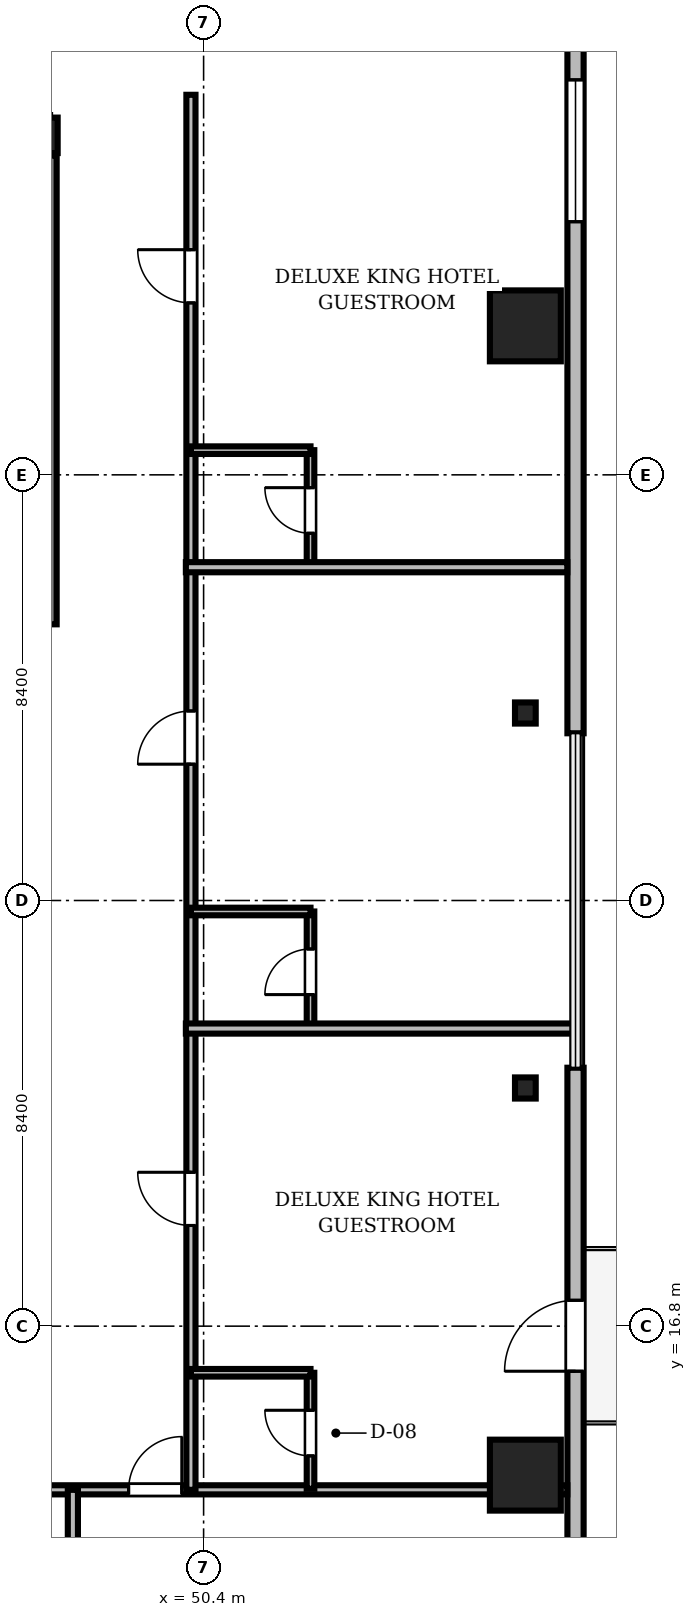
"""IFC4 building model, lengths in metres.
Left out: names, types, materials, properties, quantities, classifications, styles, units other than length and angle.
Written with IfcOpenShell. Run it as: python <this file> out.ifc"""

import sys

from ifc_helpers import new_model, si_unit, direction, frame, frame_2d, origin, origin_2d, place, context, subcontext, project, spatial, rectangle, i_section, extrude, source, transform, mapped, element, fill, save


model = new_model("IFC4")
c1 = context("Model", 3, precision=1e-05, world=origin(), true_north=direction((0.0, 1.0)))
c2 = subcontext(c1, "Body", "Model", "MODEL_VIEW")
j1 = project(units=[si_unit("LENGTHUNIT", "METRE"), si_unit("PLANEANGLEUNIT", "RADIAN")], contexts=[c1])
p1 = place(None, origin())
s1 = spatial("IfcSite", under=j1, at=p1, CompositionType="ELEMENT")
p2 = place(p1, origin())
s2 = spatial("IfcBuilding", under=s1, at=p2, CompositionType="ELEMENT")
p3 = place(p2, frame((0.0, 0.0, 188.55)))
s3 = spatial("IfcBuildingStorey", under=s2, at=p3, CompositionType="ELEMENT", Elevation=188.55)
m1 = source(origin(), c2, "Body", "SweptSolid", [
    extrude(i_section(OverallWidth=0.3, OverallDepth=0.7, WebThickness=0.017, FlangeThickness=0.032, FilletRadius=0.027, at=origin_2d()), origin(), (0.0, 0.0, 1.0), 3.53),
])
p4 = place(p3, frame((47.37, 40.3, 0.0), z_axis=(0.0, 0.0, 1.0), x_axis=(1.0, 0.0, 0.0)))
e1 = element("IfcColumn", 1, at=p4, inside=s3, PredefinedType="COLUMN", context=c2, shape_type="MappedRepresentation", body=[
    mapped(m1, transform((0.0, 0.0, 0.0), scale=1.0)),
])
m2 = source(origin(), c2, "Body", "SweptSolid", [
    extrude(rectangle(XDim=1.4, YDim=1.4, at=origin_2d()), origin(), (0.0, 0.0, 1.0), 3.53),
])
for number, where, z_axis, x_axis in (
    (2, (56.75, 13.86, 0.0), (0.0, 0.0, 1.0), (1.0, 0.0, 0.0)),
    (3, (56.75, 36.54, 0.0), (0.0, 0.0, 1.0), (1.0, 0.0, 0.0)),
):
    element("IfcColumn", number, at=place(p3, frame(where, z_axis=z_axis, x_axis=x_axis)), inside=s3, PredefinedType="COLUMN", context=c2, shape_type="MappedRepresentation", body=[
        mapped(m2, transform((0.0, 0.0, 0.0), scale=1.0)),
    ])
m3 = source(origin(), c2, "Body", "SweptSolid", [
    extrude(i_section(OverallWidth=0.409, OverallDepth=0.417, WebThickness=0.021, FlangeThickness=0.033, FilletRadius=0.015, at=origin_2d()), origin(), (0.0, 0.0, 1.0), 3.53),
])
for number, where, z_axis, x_axis in (
    (4, (56.75, 21.5, 0.0), (0.0, 0.0, 1.0), (1.0, 0.0, 0.0)),
    (5, (56.75, 28.9, 0.0), (0.0, 0.0, 1.0), (1.0, 0.0, 0.0)),
):
    element("IfcColumn", number, at=place(p3, frame(where, z_axis=z_axis, x_axis=x_axis)), inside=s3, PredefinedType="COLUMN", context=c2, shape_type="MappedRepresentation", body=[
        mapped(m3, transform((0.0, 0.0, 0.0), scale=1.0)),
    ])
m4 = source(origin(), c2, "Body", "SweptSolid", [
    extrude(rectangle(XDim=15.6, YDim=0.32, at=frame_2d((7.8, 0.0))), origin(), (0.0, 0.0, 1.0), 3.53),
])
p5 = place(p3, frame((57.74, 6.3, 0.0), z_axis=(0.0, 0.0, 1.0), x_axis=(0.0, 1.0, 0.0)))
e6 = element("IfcWall", 6, at=p5, inside=s3, PredefinedType="SOLIDWALL", context=c2, shape_type="MappedRepresentation", body=[
    mapped(m4, transform((0.0, 0.0, 0.0), scale=1.0)),
])
m5 = source(origin(), c2, "Body", "SweptSolid", [
    extrude(rectangle(XDim=1.4, YDim=2.3, at=frame_2d((0.7, 1.15))), frame((0.0, 0.17, 0.0), z_axis=(0.0, -1.0, 0.0), x_axis=(1.0, 0.0, 0.0)), (0.0, 0.0, 1.0), 0.34),
])
p6 = place(p5, frame((9.61, 0.0, 0.0)))
e7 = element("IfcOpeningElement", 7, at=p6, cuts=e6, PredefinedType="OPENING", context=c2, shape_type="MappedRepresentation", body=[
    mapped(m5, transform((0.0, 0.0, 0.0), scale=1.0)),
])
m6 = source(origin(), c2, "Body", "SweptSolid", [
    extrude(rectangle(XDim=2.8, YDim=2.4, at=frame_2d((1.4, 1.2))), frame((0.0, 0.17, 0.0), z_axis=(0.0, -1.0, 0.0), x_axis=(1.0, 0.0, 0.0)), (0.0, 0.0, 1.0), 0.34),
])
p7 = place(p5, frame((2.705, 0.0, 0.72)))
e8 = element("IfcOpeningElement", 8, at=p7, cuts=e6, PredefinedType="OPENING", context=c2, shape_type="MappedRepresentation", body=[
    mapped(m6, transform((0.0, 0.0, 0.0), scale=1.0)),
])
m7 = source(origin(), c2, "Body", "SweptSolid", [
    extrude(rectangle(XDim=15.6, YDim=0.32, at=frame_2d((7.8, 0.0))), origin(), (0.0, 0.0, 1.0), 3.53),
])
p8 = place(p3, frame((57.74, 28.5, 0.0), z_axis=(0.0, 0.0, 1.0), x_axis=(0.0, 1.0, 0.0)))
e9 = element("IfcWall", 9, at=p8, inside=s3, PredefinedType="SOLIDWALL", context=c2, shape_type="MappedRepresentation", body=[
    mapped(m7, transform((0.0, 0.0, 0.0), scale=1.0)),
])
p9 = place(p8, frame((10.095, 0.0, 0.72)))
e10 = element("IfcOpeningElement", 10, at=p9, cuts=e9, PredefinedType="OPENING", context=c2, shape_type="MappedRepresentation", body=[
    mapped(m6, transform((0.0, 0.0, 0.0), scale=1.0)),
])
m8 = source(origin(), c2, "Body", "SweptSolid", [
    extrude(rectangle(XDim=9.25, YDim=0.25, at=frame_2d((4.625, 0.0))), origin(), (0.0, 0.0, 1.0), 3.55),
])
p10 = place(p3, frame((47.375, 30.65, 0.0), z_axis=(0.0, 0.0, 1.0), x_axis=(0.0, 1.0, 0.0)))
e11 = element("IfcWall", 11, at=p10, inside=s3, PredefinedType="SOLIDWALL", context=c2, shape_type="MappedRepresentation", body=[
    mapped(m8, transform((0.0, 0.0, 0.0), scale=1.0)),
])
m9 = source(origin(), c2, "Body", "SweptSolid", [
    extrude(rectangle(XDim=46.156, YDim=0.18, at=frame_2d((23.078, 0.0))), origin(), (0.0, 0.0, 1.0), 2.772),
])
p11 = place(p3, frame((11.422, 13.57, 0.0), z_axis=(0.0, 0.0, 1.0), x_axis=(1.0, 0.0, 0.0)))
e12 = element("IfcWall", 12, at=p11, inside=s3, PredefinedType="PARTITIONING", context=c2, shape_type="MappedRepresentation", body=[
    mapped(m9, transform((0.0, 0.0, 0.0), scale=1.0)),
])
m10 = source(origin(), c2, "Body", "SweptSolid", [
    extrude(rectangle(XDim=1.05, YDim=2.2, at=frame_2d((0.525, 1.1))), frame((0.0, 0.1, 0.0), z_axis=(0.0, -1.0, 0.0), x_axis=(1.0, 0.0, 0.0)), (0.0, 0.0, 1.0), 0.2),
])
p12 = place(p11, frame((11.798, 0.0, 0.0)))
e13 = element("IfcOpeningElement", 13, at=p12, cuts=e12, PredefinedType="OPENING", context=c2, shape_type="MappedRepresentation", body=[
    mapped(m10, transform((0.0, 0.0, 0.0), scale=1.0)),
])
p13 = place(p11, frame((16.503, 0.0, 0.0)))
e14 = element("IfcOpeningElement", 14, at=p13, cuts=e12, PredefinedType="OPENING", context=c2, shape_type="MappedRepresentation", body=[
    mapped(m10, transform((0.0, 0.0, 0.0), scale=1.0)),
])
p14 = place(p11, frame((24.253, 0.0, 0.0)))
e15 = element("IfcOpeningElement", 15, at=p14, cuts=e12, PredefinedType="OPENING", context=c2, shape_type="MappedRepresentation", body=[
    mapped(m10, transform((0.0, 0.0, 0.0), scale=1.0)),
])
p15 = place(p11, frame((32.003, 0.0, 0.0)))
e16 = element("IfcOpeningElement", 16, at=p15, cuts=e12, PredefinedType="OPENING", context=c2, shape_type="MappedRepresentation", body=[
    mapped(m10, transform((0.0, 0.0, 0.0), scale=1.0)),
])
p16 = place(p11, frame((37.498, 0.0, 0.0)))
e17 = element("IfcOpeningElement", 17, at=p16, cuts=e12, PredefinedType="OPENING", context=c2, shape_type="MappedRepresentation", body=[
    mapped(m10, transform((0.0, 0.0, 0.0), scale=1.0)),
])
m11 = source(origin(), c2, "Body", "SweptSolid", [
    extrude(rectangle(XDim=27.53, YDim=0.18, at=frame_2d((13.765, 0.0))), origin(), (0.0, 0.0, 1.0), 2.972),
])
p17 = place(p3, frame((50.15, 13.57, 0.0), z_axis=(0.0, 0.0, 1.0), x_axis=(0.0, 1.0, 0.0)))
e18 = element("IfcWall", 18, at=p17, inside=s3, PredefinedType="PARTITIONING", context=c2, shape_type="MappedRepresentation", body=[
    mapped(m11, transform((0.0, 0.0, 0.0), scale=1.0)),
])
p18 = place(p17, frame((5.217, 0.0, 0.0)))
e19 = element("IfcOpeningElement", 19, at=p18, cuts=e18, PredefinedType="OPENING", context=c2, shape_type="MappedRepresentation", body=[
    mapped(m10, transform((0.0, 0.0, 0.0), scale=1.0)),
])
p19 = place(p17, frame((14.32, 0.0, 0.0)))
e20 = element("IfcOpeningElement", 20, at=p19, cuts=e18, PredefinedType="OPENING", context=c2, shape_type="MappedRepresentation", body=[
    mapped(m10, transform((0.0, 0.0, 0.0), scale=1.0)),
])
p20 = place(p17, frame((23.423, 0.0, 0.0)))
e21 = element("IfcOpeningElement", 21, at=p20, cuts=e18, PredefinedType="OPENING", context=c2, shape_type="MappedRepresentation", body=[
    mapped(m10, transform((0.0, 0.0, 0.0), scale=1.0)),
])
m12 = source(origin(), c2, "Body", "SweptSolid", [
    extrude(rectangle(XDim=2.29, YDim=0.15, at=frame_2d((1.145, 0.0))), origin(), (0.0, 0.0, 1.0), 2.972),
])
p21 = place(p3, frame((52.51, 13.59, 0.0), z_axis=(0.0, 0.0, 1.0), x_axis=(0.0, 1.0, 0.0)))
e22 = element("IfcWall", 22, at=p21, inside=s3, PredefinedType="PARTITIONING", context=c2, shape_type="MappedRepresentation", body=[
    mapped(m12, transform((0.0, 0.0, 0.0), scale=1.0)),
])
m13 = source(origin(), c2, "Body", "SweptSolid", [
    extrude(rectangle(XDim=0.9, YDim=2.1, at=frame_2d((0.45, 1.05))), frame((0.0, 0.085, 0.0), z_axis=(0.0, -1.0, 0.0), x_axis=(1.0, 0.0, 0.0)), (0.0, 0.0, 1.0), 0.17),
])
p22 = place(p21, frame((0.65, 0.0, 0.0)))
e23 = element("IfcOpeningElement", 23, at=p22, cuts=e22, PredefinedType="OPENING", context=c2, shape_type="MappedRepresentation", body=[
    mapped(m13, transform((0.0, 0.0, 0.0), scale=1.0)),
])
m14 = source(origin(), c2, "Body", "SweptSolid", [
    extrude(rectangle(XDim=2.29, YDim=0.15, at=frame_2d((1.145, 0.0))), origin(), (0.0, 0.0, 1.0), 3.192),
])
p23 = place(p3, frame((52.51, 22.693, 0.0), z_axis=(0.0, 0.0, 1.0), x_axis=(0.0, 1.0, 0.0)))
e24 = element("IfcWall", 24, at=p23, inside=s3, PredefinedType="PARTITIONING", context=c2, shape_type="MappedRepresentation", body=[
    mapped(m14, transform((0.0, 0.0, 0.0), scale=1.0)),
])
p24 = place(p23, frame((0.65, 0.0, 0.0)))
e25 = element("IfcOpeningElement", 25, at=p24, cuts=e24, PredefinedType="OPENING", context=c2, shape_type="MappedRepresentation", body=[
    mapped(m13, transform((0.0, 0.0, 0.0), scale=1.0)),
])
m15 = source(origin(), c2, "Body", "SweptSolid", [
    extrude(rectangle(XDim=2.29, YDim=0.15, at=frame_2d((1.145, 0.0))), origin(), (0.0, 0.0, 1.0), 3.53),
])
p25 = place(p3, frame((52.51, 31.797, 0.0), z_axis=(0.0, 0.0, 1.0), x_axis=(0.0, 1.0, 0.0)))
e26 = element("IfcWall", 26, at=p25, inside=s3, PredefinedType="PARTITIONING", context=c2, shape_type="MappedRepresentation", body=[
    mapped(m15, transform((0.0, 0.0, 0.0), scale=1.0)),
])
p26 = place(p25, frame((0.65, 0.0, 0.0)))
e27 = element("IfcOpeningElement", 27, at=p26, cuts=e26, PredefinedType="OPENING", context=c2, shape_type="MappedRepresentation", body=[
    mapped(m13, transform((0.0, 0.0, 0.0), scale=1.0)),
])
m16 = source(origin(), c2, "Body", "SweptSolid", [
    extrude(rectangle(XDim=11.448, YDim=0.2, at=frame_2d((5.724, 0.0))), origin(), (0.0, 0.0, 1.0), 2.772),
])
p27 = place(p3, frame((47.82, 2.122, 0.0), z_axis=(0.0, 0.0, 1.0), x_axis=(0.0, 1.0, 0.0)))
e28 = element("IfcWall", 28, at=p27, inside=s3, PredefinedType="PARTITIONING", context=c2, shape_type="MappedRepresentation", body=[
    mapped(m16, transform((0.0, 0.0, 0.0), scale=1.0)),
])
m17 = source(origin(), c2, "Body", "SweptSolid", [
    extrude(rectangle(XDim=7.72, YDim=0.2, at=frame_2d((3.86, 0.0))), origin(), (0.0, 0.0, 1.0), 2.772),
])
p28 = place(p3, frame((50.05, 22.673, 0.0), z_axis=(0.0, 0.0, 1.0), x_axis=(1.0, 0.0, 0.0)))
e29 = element("IfcWall", 29, at=p28, inside=s3, PredefinedType="PARTITIONING", context=c2, shape_type="MappedRepresentation", body=[
    mapped(m17, transform((0.0, 0.0, 0.0), scale=1.0)),
])
m18 = source(origin(), c2, "Body", "SweptSolid", [
    extrude(rectangle(XDim=7.528, YDim=0.2, at=frame_2d((3.764, 0.0))), origin(), (0.0, 0.0, 1.0), 2.772),
])
p29 = place(p3, frame((50.05, 31.777, 0.0), z_axis=(0.0, 0.0, 1.0), x_axis=(1.0, 0.0, 0.0)))
e30 = element("IfcWall", 30, at=p29, inside=s3, PredefinedType="PARTITIONING", context=c2, shape_type="MappedRepresentation", body=[
    mapped(m18, transform((0.0, 0.0, 0.0), scale=1.0)),
])
m19 = source(origin(), c2, "Body", "SweptSolid", [
    extrude(rectangle(XDim=2.36, YDim=0.15, at=frame_2d((1.18, 0.0))), origin(), (0.0, 0.0, 1.0), 3.53),
])
for number, where, z_axis, x_axis in (
    (31, (50.15, 15.88, 0.0), (0.0, 0.0, 1.0), (1.0, 0.0, 0.0)),
    (32, (50.15, 24.983, 0.0), (0.0, 0.0, 1.0), (1.0, 0.0, 0.0)),
    (33, (50.15, 34.087, 0.0), (0.0, 0.0, 1.0), (1.0, 0.0, 0.0)),
):
    element("IfcWall", number, at=place(p3, frame(where, z_axis=z_axis, x_axis=x_axis)), inside=s3, PredefinedType="PARTITIONING", context=c2, shape_type="MappedRepresentation", body=[
        mapped(m19, transform((0.0, 0.0, 0.0), scale=1.0)),
    ])
m20 = source(origin(), c2, "Body", "SweptSolid", [
    extrude(rectangle(XDim=1.4, YDim=2.3, at=frame_2d((0.7, 1.15))), frame((0.0, 0.025, 0.0), z_axis=(0.0, -1.0, 0.0), x_axis=(1.0, 0.0, 0.0)), (0.0, 0.0, 1.0), 0.05),
])
p30 = place(p6, frame((1.4, 0.0, 0.0), z_axis=(0.0, 0.0, 1.0), x_axis=(-1.0, 0.0, 0.0)))
e34 = element("IfcDoor", 34, at=p30, inside=s3, OperationType="DOUBLE_DOOR_SLIDING", PredefinedType="DOOR", context=c2, shape_type="MappedRepresentation", body=[
    mapped(m20, transform((0.0, 0.0, 0.0), scale=1.0)),
])
fill(e7, e34)
m21 = source(origin(), c2, "Body", "SweptSolid", [
    extrude(rectangle(XDim=2.8, YDim=2.4, at=frame_2d((1.4, 1.2))), frame((0.0, 0.03, 0.0), z_axis=(0.0, -1.0, 0.0), x_axis=(1.0, 0.0, 0.0)), (0.0, 0.0, 1.0), 0.06),
])
p31 = place(p9, origin())
e35 = element("IfcWindow", 35, at=p31, inside=s3, PartitioningType="SINGLE_PANEL", PredefinedType="WINDOW", context=c2, shape_type="MappedRepresentation", body=[
    mapped(m21, transform((0.0, 0.0, 0.0), scale=1.0)),
])
fill(e10, e35)
m22 = source(origin(), c2, "Body", "SweptSolid", [
    extrude(rectangle(XDim=1.05, YDim=2.2, at=frame_2d((0.525, 1.1))), frame((0.0, 0.025, 0.0), z_axis=(0.0, -1.0, 0.0), x_axis=(1.0, 0.0, 0.0)), (0.0, 0.0, 1.0), 0.05),
])
p32 = place(p16, origin())
e36 = element("IfcDoor", 36, at=p32, inside=s3, OperationType="SINGLE_SWING_RIGHT", PredefinedType="DOOR", context=c2, shape_type="MappedRepresentation", body=[
    mapped(m22, transform((0.0, 0.0, 0.0), scale=1.0)),
])
fill(e17, e36)
p33 = place(p18, origin())
e37 = element("IfcDoor", 37, at=p33, inside=s3, OperationType="SINGLE_SWING_RIGHT", PredefinedType="DOOR", context=c2, shape_type="MappedRepresentation", body=[
    mapped(m22, transform((0.0, 0.0, 0.0), scale=1.0)),
])
fill(e19, e37)
p34 = place(p19, origin())
e38 = element("IfcDoor", 38, at=p34, inside=s3, OperationType="SINGLE_SWING_LEFT", PredefinedType="DOOR", context=c2, shape_type="MappedRepresentation", body=[
    mapped(m22, transform((0.0, 0.0, 0.0), scale=1.0)),
])
fill(e20, e38)
p35 = place(p20, origin())
e39 = element("IfcDoor", 39, at=p35, inside=s3, OperationType="SINGLE_SWING_RIGHT", PredefinedType="DOOR", context=c2, shape_type="MappedRepresentation", body=[
    mapped(m22, transform((0.0, 0.0, 0.0), scale=1.0)),
])
fill(e21, e39)
m23 = source(origin(), c2, "Body", "SweptSolid", [
    extrude(rectangle(XDim=0.9, YDim=2.1, at=frame_2d((0.45, 1.05))), frame((0.0, 0.025, 0.0), z_axis=(0.0, -1.0, 0.0), x_axis=(1.0, 0.0, 0.0)), (0.0, 0.0, 1.0), 0.05),
])
p36 = place(p22, origin())
e40 = element("IfcDoor", 40, at=p36, inside=s3, OperationType="SINGLE_SWING_RIGHT", PredefinedType="DOOR", context=c2, shape_type="MappedRepresentation", body=[
    mapped(m23, transform((0.0, 0.0, 0.0), scale=1.0)),
])
fill(e23, e40)
p37 = place(p24, origin())
e41 = element("IfcDoor", 41, at=p37, inside=s3, OperationType="SINGLE_SWING_LEFT", PredefinedType="DOOR", context=c2, shape_type="MappedRepresentation", body=[
    mapped(m23, transform((0.0, 0.0, 0.0), scale=1.0)),
])
fill(e25, e41)
p38 = place(p26, origin())
e42 = element("IfcDoor", 42, at=p38, inside=s3, OperationType="SINGLE_SWING_RIGHT", PredefinedType="DOOR", context=c2, shape_type="MappedRepresentation", body=[
    mapped(m23, transform((0.0, 0.0, 0.0), scale=1.0)),
])
fill(e27, e42)
save(model, sys.argv[1])
